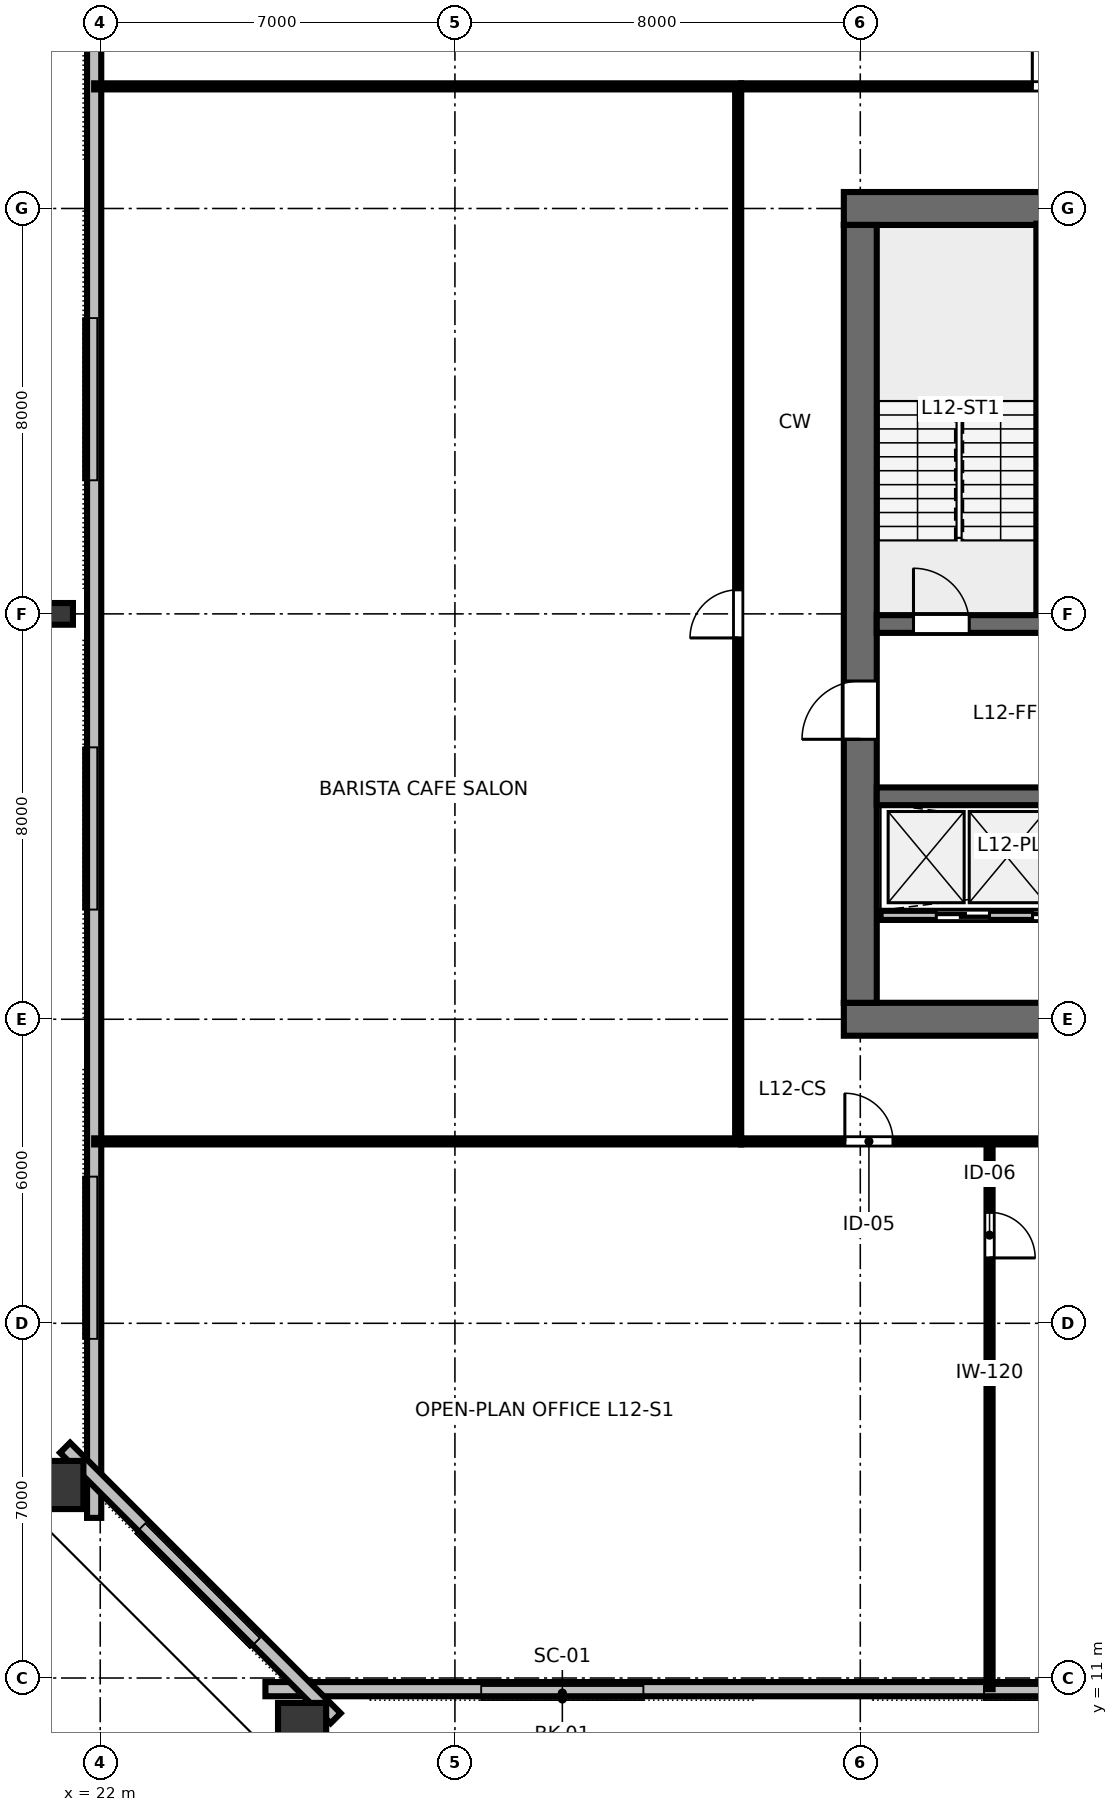
"""IFC4 building model, lengths in metres.
Left out: names, types, materials, properties, quantities, classifications, styles, units other than length and angle.
Written with IfcOpenShell. Run it as: python <this file> out.ifc"""

import sys

from ifc_helpers import new_model, si_unit, direction, frame, frame_2d, origin, origin_2d, place, context, subcontext, project, spatial, rectangle, hollow_rectangle, i_section, extrude, element, fill, save


model = new_model("IFC4")
c1 = context("Model", 3, precision=1e-05, world=origin(), true_north=direction((0.0, 1.0)))
c2 = subcontext(c1, "Body", "Model", "MODEL_VIEW")
j1 = project(units=[si_unit("LENGTHUNIT", "METRE"), si_unit("PLANEANGLEUNIT", "RADIAN")], contexts=[c1])
p1 = place(None, origin())
s1 = spatial("IfcSite", under=j1, at=p1, CompositionType="ELEMENT")
p2 = place(p1, origin())
s2 = spatial("IfcBuilding", under=s1, at=p2, CompositionType="ELEMENT")
p3 = place(p2, frame((0.0, 0.0, 49.6)))
s3 = spatial("IfcBuildingStorey", under=s2, at=p3, CompositionType="ELEMENT", Elevation=49.6)
p4 = place(p3, frame((36.675, 24.0, 0.0), z_axis=(0.0, 0.0, 1.0), x_axis=(1.0, 0.0, 0.0)))
e1 = element("IfcWall", 1, at=p4, inside=s3, PredefinedType="SHEAR", context=c2, shape_type="SweptSolid", body=[
    extrude(rectangle(XDim=18.65, YDim=0.65, at=frame_2d((9.325, 0.0))), origin(), (0.0, 0.0, 1.0), 3.36),
])
p5 = place(p4, frame((5.725, 0.0, 0.0)))
e2 = element("IfcOpeningElement", 2, at=p5, cuts=e1, PredefinedType="OPENING", context=c2, shape_type="SweptSolid", body=[
    extrude(rectangle(XDim=1.6, YDim=2.15, at=frame_2d((0.8, 1.075))), frame((0.0, 0.335, 0.0), z_axis=(0.0, -1.0, 0.0), x_axis=(1.0, 0.0, 0.0)), (0.0, 0.0, 1.0), 0.67),
])
p6 = place(p4, frame((12.125, 0.0, 0.0)))
e3 = element("IfcOpeningElement", 3, at=p6, cuts=e1, PredefinedType="OPENING", context=c2, shape_type="SweptSolid", body=[
    extrude(rectangle(XDim=1.6, YDim=2.15, at=frame_2d((0.8, 1.075))), frame((0.0, 0.335, 0.0), z_axis=(0.0, -1.0, 0.0), x_axis=(1.0, 0.0, 0.0)), (0.0, 0.0, 1.0), 0.67),
])
p7 = place(p3, frame((36.675, 40.0, 0.0), z_axis=(0.0, 0.0, 1.0), x_axis=(1.0, 0.0, 0.0)))
e4 = element("IfcWall", 4, at=p7, inside=s3, PredefinedType="SHEAR", context=c2, shape_type="SweptSolid", body=[
    extrude(rectangle(XDim=18.65, YDim=0.65, at=frame_2d((9.325, 0.0))), origin(), (0.0, 0.0, 1.0), 3.36),
])
p8 = place(p7, frame((8.825, 0.0, 0.0)))
e5 = element("IfcOpeningElement", 5, at=p8, cuts=e4, PredefinedType="OPENING", context=c2, shape_type="SweptSolid", body=[
    extrude(rectangle(XDim=1.0, YDim=2.15, at=frame_2d((0.5, 1.075))), frame((0.0, 0.335, 0.0), z_axis=(0.0, -1.0, 0.0), x_axis=(1.0, 0.0, 0.0)), (0.0, 0.0, 1.0), 0.67),
])
p9 = place(p3, frame((37.0, 24.325, 0.0), z_axis=(0.0, 0.0, 1.0), x_axis=(0.0, 1.0, 0.0)))
e6 = element("IfcWall", 6, at=p9, inside=s3, PredefinedType="SHEAR", context=c2, shape_type="SweptSolid", body=[
    extrude(rectangle(XDim=15.35, YDim=0.65, at=frame_2d((7.675, 0.0))), origin(), (0.0, 0.0, 1.0), 3.36),
])
p10 = place(p9, frame((5.2, 0.0, 0.0)))
e7 = element("IfcOpeningElement", 7, at=p10, cuts=e6, PredefinedType="OPENING", context=c2, shape_type="SweptSolid", body=[
    extrude(rectangle(XDim=1.15, YDim=2.15, at=frame_2d((0.575, 1.075))), frame((0.0, 0.335, 0.0), z_axis=(0.0, -1.0, 0.0), x_axis=(1.0, 0.0, 0.0)), (0.0, 0.0, 1.0), 0.67),
])
p11 = place(p3, frame((37.325, 31.8, 0.0), z_axis=(0.0, 0.0, 1.0), x_axis=(1.0, 0.0, 0.0)))
e8 = element("IfcWall", 8, at=p11, inside=s3, PredefinedType="SHEAR", context=c2, shape_type="SweptSolid", body=[
    extrude(rectangle(XDim=17.35, YDim=0.35, at=frame_2d((8.675, 0.0))), origin(), (0.0, 0.0, 1.0), 3.36),
])
p12 = place(p11, frame((0.725, 0.0, 0.0)))
e9 = element("IfcOpeningElement", 9, at=p12, cuts=e8, PredefinedType="OPENING", context=c2, shape_type="SweptSolid", body=[
    extrude(rectangle(XDim=1.1, YDim=2.15, at=frame_2d((0.55, 1.075))), frame((0.0, 0.185, 0.0), z_axis=(0.0, -1.0, 0.0), x_axis=(1.0, 0.0, 0.0)), (0.0, 0.0, 1.0), 0.37),
])
p13 = place(p11, frame((14.625, 0.0, 0.0)))
e10 = element("IfcOpeningElement", 10, at=p13, cuts=e8, PredefinedType="OPENING", context=c2, shape_type="SweptSolid", body=[
    extrude(rectangle(XDim=1.1, YDim=2.15, at=frame_2d((0.55, 1.075))), frame((0.0, 0.185, 0.0), z_axis=(0.0, -1.0, 0.0), x_axis=(1.0, 0.0, 0.0)), (0.0, 0.0, 1.0), 0.37),
])
p14 = place(p3, frame((37.325, 28.4, 0.0), z_axis=(0.0, 0.0, 1.0), x_axis=(1.0, 0.0, 0.0)))
e11 = element("IfcWall", 11, at=p14, inside=s3, PredefinedType="SHEAR", context=c2, shape_type="SweptSolid", body=[
    extrude(rectangle(XDim=17.35, YDim=0.35, at=frame_2d((8.675, 0.0))), origin(), (0.0, 0.0, 1.0), 3.36),
])
p15 = place(p3, frame((25.984, 9.933, 0.0), z_axis=(0.0, 0.0, 1.0), x_axis=(1.0, 0.0, 0.0)))
e12 = element("IfcColumn", 12, at=p15, inside=s3, PredefinedType="COLUMN", context=c2, shape_type="SweptSolid", body=[
    extrude(hollow_rectangle(XDim=0.95, YDim=1.15, WallThickness=0.06, at=origin_2d()), origin(), (0.0, 0.0, 1.0), 3.358),
])
p16 = place(p3, frame((21.22, 32.0, 0.0), z_axis=(0.0, 0.0, 1.0), x_axis=(0.0, 1.0, 0.0)))
e13 = element("IfcColumn", 13, at=p16, inside=s3, PredefinedType="COLUMN", context=c2, shape_type="SweptSolid", body=[
    extrude(i_section(OverallWidth=0.428, OverallDepth=0.483, WebThickness=0.051, FlangeThickness=0.082, FilletRadius=0.025, at=origin_2d()), origin(), (0.0, 0.0, 1.0), 3.358),
])
p17 = place(p3, frame((21.093, 14.809, 0.0), z_axis=(0.0, 0.0, 1.0), x_axis=(0.0, 1.0, 0.0)))
e14 = element("IfcColumn", 14, at=p17, inside=s3, PredefinedType="COLUMN", context=c2, shape_type="SweptSolid", body=[
    extrude(hollow_rectangle(XDim=0.95, YDim=1.15, WallThickness=0.06, at=origin_2d()), origin(), (0.0, 0.0, 1.0), 3.358),
])
p18 = place(p3, frame((25.26, 10.78, 0.0), z_axis=(0.0, 0.0, 1.0), x_axis=(1.0, 0.0, 0.0)))
e15 = element("IfcWall", 15, at=p18, inside=s3, PredefinedType="STANDARD", context=c2, shape_type="SweptSolid", body=[
    extrude(rectangle(XDim=41.48, YDim=0.28, at=frame_2d((20.74, 0.0))), origin(), (0.0, 0.0, 1.0), 3.36),
])
p19 = place(p3, frame((21.88, 49.84, 0.0), z_axis=(0.0, 0.0, 1.0), x_axis=(0.0, -1.0, 0.0)))
e16 = element("IfcWall", 16, at=p19, inside=s3, PredefinedType="STANDARD", context=c2, shape_type="SweptSolid", body=[
    extrude(rectangle(XDim=35.68, YDim=0.28, at=frame_2d((17.84, 0.0))), origin(), (0.0, 0.0, 1.0), 3.36),
])
p20 = place(p3, frame((21.306, 15.545, 0.0), z_axis=(0.0, 0.0, 1.0), x_axis=(0.707106781187, -0.707106781187, 0.0)))
e17 = element("IfcWall", 17, at=p20, inside=s3, PredefinedType="STANDARD", context=c2, shape_type="SweptSolid", body=[
    extrude(rectangle(XDim=7.551, YDim=0.28, at=frame_2d((3.775, 0.0))), origin(), (0.0, 0.0, 1.0), 3.36),
])
p21 = place(p3, frame((40.65, 32.0, 0.0), z_axis=(0.0, 0.0, 1.0), x_axis=(0.0, 1.0, 0.0)))
e18 = element("IfcWall", 18, at=p21, inside=s3, PredefinedType="SHEAR", context=c2, shape_type="SweptSolid", body=[
    extrude(rectangle(XDim=7.7, YDim=0.35, at=frame_2d((3.85, 0.0))), origin(), (0.0, 0.0, 1.0), 3.6),
])
p22 = place(p3, frame((37.4, 26.05, 0.0), z_axis=(0.0, 0.0, 1.0), x_axis=(1.0, 0.0, 0.0)))
e19 = element("IfcWall", 19, at=p22, inside=s3, PredefinedType="PARTITIONING", context=c2, shape_type="SweptSolid", body=[
    extrude(rectangle(XDim=17.2, YDim=0.18, at=frame_2d((8.6, 0.0))), origin(), (0.0, 0.0, 1.0), 3.36),
])
p23 = place(p22, frame((1.1, 0.0, 0.0)))
e20 = element("IfcOpeningElement", 20, at=p23, cuts=e19, PredefinedType="OPENING", context=c2, shape_type="SweptSolid", body=[
    extrude(rectangle(XDim=1.05, YDim=2.15, at=frame_2d((0.525, 1.075))), frame((0.0, 0.1, 0.0), z_axis=(0.0, -1.0, 0.0), x_axis=(1.0, 0.0, 0.0)), (0.0, 0.0, 1.0), 0.2),
])
p24 = place(p22, frame((3.0, 0.0, 0.0)))
e21 = element("IfcOpeningElement", 21, at=p24, cuts=e19, PredefinedType="OPENING", context=c2, shape_type="SweptSolid", body=[
    extrude(rectangle(XDim=1.05, YDim=2.15, at=frame_2d((0.525, 1.075))), frame((0.0, 0.1, 0.0), z_axis=(0.0, -1.0, 0.0), x_axis=(1.0, 0.0, 0.0)), (0.0, 0.0, 1.0), 0.2),
])
p25 = place(p3, frame((39.551, 21.59, 0.0), z_axis=(0.0, 0.0, 1.0), x_axis=(0.0, -1.0, 0.0)))
e22 = element("IfcWall", 22, at=p25, inside=s3, PredefinedType="PARTITIONING", context=c2, shape_type="SweptSolid", body=[
    extrude(rectangle(XDim=10.81, YDim=0.12, at=frame_2d((5.405, 0.0))), origin(), (0.0, 0.0, 1.0), 2.64),
])
p26 = place(p25, frame((1.4, 0.0, 0.0)))
e23 = element("IfcOpeningElement", 23, at=p26, cuts=e22, PredefinedType="OPENING", context=c2, shape_type="SweptSolid", body=[
    extrude(rectangle(XDim=0.9, YDim=2.15, at=frame_2d((0.45, 1.075))), frame((0.0, 0.07, 0.0), z_axis=(0.0, -1.0, 0.0), x_axis=(1.0, 0.0, 0.0)), (0.0, 0.0, 1.0), 0.14),
])
p27 = place(p3, frame((34.65, 21.59, 0.0), z_axis=(0.0, 0.0, 1.0), x_axis=(1.0, 0.0, 0.0)))
e24 = element("IfcWall", 24, at=p27, inside=s3, PredefinedType="PARTITIONING", context=c2, shape_type="SweptSolid", body=[
    extrude(rectangle(XDim=22.7, YDim=0.12, at=frame_2d((11.35, 0.0))), origin(), (0.0, 0.0, 1.0), 2.64),
])
p28 = place(p27, frame((2.045, 0.0, 0.0)))
e25 = element("IfcOpeningElement", 25, at=p28, cuts=e24, PredefinedType="OPENING", context=c2, shape_type="SweptSolid", body=[
    extrude(rectangle(XDim=0.95, YDim=2.15, at=frame_2d((0.475, 1.075))), frame((0.0, 0.07, 0.0), z_axis=(0.0, -1.0, 0.0), x_axis=(1.0, 0.0, 0.0)), (0.0, 0.0, 1.0), 0.14),
])
p29 = place(p27, frame((7.126, 0.0, 0.0)))
e26 = element("IfcOpeningElement", 26, at=p29, cuts=e24, PredefinedType="OPENING", context=c2, shape_type="SweptSolid", body=[
    extrude(rectangle(XDim=0.95, YDim=2.15, at=frame_2d((0.475, 1.075))), frame((0.0, 0.07, 0.0), z_axis=(0.0, -1.0, 0.0), x_axis=(1.0, 0.0, 0.0)), (0.0, 0.0, 1.0), 0.14),
])
p30 = place(p27, frame((11.509, 0.0, 0.0)))
e27 = element("IfcOpeningElement", 27, at=p30, cuts=e24, PredefinedType="OPENING", context=c2, shape_type="SweptSolid", body=[
    extrude(rectangle(XDim=0.95, YDim=2.15, at=frame_2d((0.475, 1.075))), frame((0.0, 0.07, 0.0), z_axis=(0.0, -1.0, 0.0), x_axis=(1.0, 0.0, 0.0)), (0.0, 0.0, 1.0), 0.14),
])
p31 = place(p27, frame((17.638, 0.0, 0.0)))
e28 = element("IfcOpeningElement", 28, at=p31, cuts=e24, PredefinedType="OPENING", context=c2, shape_type="SweptSolid", body=[
    extrude(rectangle(XDim=0.95, YDim=2.15, at=frame_2d((0.475, 1.075))), frame((0.0, 0.07, 0.0), z_axis=(0.0, -1.0, 0.0), x_axis=(1.0, 0.0, 0.0)), (0.0, 0.0, 1.0), 0.14),
])
p32 = place(p3, frame((34.65, 42.41, 0.0), z_axis=(0.0, 0.0, 1.0), x_axis=(1.0, 0.0, 0.0)))
e29 = element("IfcWall", 29, at=p32, inside=s3, PredefinedType="PARTITIONING", context=c2, shape_type="SweptSolid", body=[
    extrude(rectangle(XDim=22.7, YDim=0.12, at=frame_2d((11.35, 0.0))), origin(), (0.0, 0.0, 1.0), 2.64),
])
p33 = place(p32, frame((5.745, 0.0, 0.0)))
e30 = element("IfcOpeningElement", 30, at=p33, cuts=e29, PredefinedType="OPENING", context=c2, shape_type="SweptSolid", body=[
    extrude(rectangle(XDim=0.95, YDim=2.15, at=frame_2d((0.475, 1.075))), frame((0.0, 0.07, 0.0), z_axis=(0.0, -1.0, 0.0), x_axis=(1.0, 0.0, 0.0)), (0.0, 0.0, 1.0), 0.14),
])
p34 = place(p32, frame((16.955, 0.0, 0.0)))
e31 = element("IfcOpeningElement", 31, at=p34, cuts=e29, PredefinedType="OPENING", context=c2, shape_type="SweptSolid", body=[
    extrude(rectangle(XDim=0.95, YDim=2.15, at=frame_2d((0.475, 1.075))), frame((0.0, 0.07, 0.0), z_axis=(0.0, -1.0, 0.0), x_axis=(1.0, 0.0, 0.0)), (0.0, 0.0, 1.0), 0.14),
])
p35 = place(p3, frame((34.59, 21.65, 0.0), z_axis=(0.0, 0.0, 1.0), x_axis=(0.0, 1.0, 0.0)))
e32 = element("IfcWall", 32, at=p35, inside=s3, PredefinedType="PARTITIONING", context=c2, shape_type="SweptSolid", body=[
    extrude(rectangle(XDim=20.7, YDim=0.12, at=frame_2d((10.35, 0.0))), origin(), (0.0, 0.0, 1.0), 2.64),
])
p36 = place(p35, frame((9.875, 0.0, 0.0)))
e33 = element("IfcOpeningElement", 33, at=p36, cuts=e32, PredefinedType="OPENING", context=c2, shape_type="SweptSolid", body=[
    extrude(rectangle(XDim=0.95, YDim=2.15, at=frame_2d((0.475, 1.075))), frame((0.0, 0.07, 0.0), z_axis=(0.0, -1.0, 0.0), x_axis=(1.0, 0.0, 0.0)), (0.0, 0.0, 1.0), 0.14),
])
for number, where, z_axis, x_axis in (
    (34, (34.65, 21.59, 0.0), (0.0, 0.0, 1.0), (-1.0, 0.0, 0.0)),
    (35, (34.65, 42.41, 0.0), (0.0, 0.0, 1.0), (-1.0, 0.0, 0.0)),
):
    element("IfcWall", number, at=place(p3, frame(where, z_axis=z_axis, x_axis=x_axis)), inside=s3, PredefinedType="PARTITIONING", context=c2, shape_type="SweptSolid", body=[
        extrude(rectangle(XDim=12.77, YDim=0.12, at=frame_2d((6.385, 0.0))), origin(), (0.0, 0.0, 1.0), 2.64),
    ])
p37 = place(p12, origin())
e36 = element("IfcDoor", 36, at=p37, inside=s3, OperationType="SINGLE_SWING_LEFT", PredefinedType="DOOR", context=c2, shape_type="SweptSolid", body=[
    extrude(rectangle(XDim=1.1, YDim=2.15, at=frame_2d((0.55, 1.075))), frame((0.0, 0.025, 0.0), z_axis=(0.0, -1.0, 0.0), x_axis=(1.0, 0.0, 0.0)), (0.0, 0.0, 1.0), 0.05),
])
fill(e9, e36)
p38 = place(p10, origin())
e37 = element("IfcDoor", 37, at=p38, inside=s3, OperationType="SINGLE_SWING_LEFT", PredefinedType="DOOR", context=c2, shape_type="SweptSolid", body=[
    extrude(rectangle(XDim=1.15, YDim=2.15, at=frame_2d((0.575, 1.075))), frame((0.0, 0.025, 0.0), z_axis=(0.0, -1.0, 0.0), x_axis=(1.0, 0.0, 0.0)), (0.0, 0.0, 1.0), 0.05),
])
fill(e7, e37)
p39 = place(p23, origin())
e38 = element("IfcDoor", 38, at=p39, inside=s3, OperationType="SLIDING_TO_LEFT", PredefinedType="DOOR", context=c2, shape_type="SweptSolid", body=[
    extrude(rectangle(XDim=1.05, YDim=2.15, at=frame_2d((0.525, 1.075))), frame((0.0, 0.025, 0.0), z_axis=(0.0, -1.0, 0.0), x_axis=(1.0, 0.0, 0.0)), (0.0, 0.0, 1.0), 0.05),
])
fill(e20, e38)
p40 = place(p24, origin())
e39 = element("IfcDoor", 39, at=p40, inside=s3, OperationType="SLIDING_TO_RIGHT", PredefinedType="DOOR", context=c2, shape_type="SweptSolid", body=[
    extrude(rectangle(XDim=1.05, YDim=2.15, at=frame_2d((0.525, 1.075))), frame((0.0, 0.025, 0.0), z_axis=(0.0, -1.0, 0.0), x_axis=(1.0, 0.0, 0.0)), (0.0, 0.0, 1.0), 0.05),
])
fill(e21, e39)
p41 = place(p26, origin())
e40 = element("IfcDoor", 40, at=p41, inside=s3, OperationType="SINGLE_SWING_RIGHT", PredefinedType="DOOR", context=c2, shape_type="SweptSolid", body=[
    extrude(rectangle(XDim=0.9, YDim=2.15, at=frame_2d((0.45, 1.075))), frame((0.0, 0.025, 0.0), z_axis=(0.0, -1.0, 0.0), x_axis=(1.0, 0.0, 0.0)), (0.0, 0.0, 1.0), 0.05),
])
fill(e23, e40)
p42 = place(p28, origin())
e41 = element("IfcDoor", 41, at=p42, inside=s3, OperationType="SINGLE_SWING_LEFT", PredefinedType="DOOR", context=c2, shape_type="SweptSolid", body=[
    extrude(rectangle(XDim=0.95, YDim=2.15, at=frame_2d((0.475, 1.075))), frame((0.0, 0.025, 0.0), z_axis=(0.0, -1.0, 0.0), x_axis=(1.0, 0.0, 0.0)), (0.0, 0.0, 1.0), 0.05),
])
fill(e25, e41)
p43 = place(p33, origin())
e42 = element("IfcDoor", 42, at=p43, inside=s3, OperationType="SINGLE_SWING_LEFT", PredefinedType="DOOR", context=c2, shape_type="SweptSolid", body=[
    extrude(rectangle(XDim=0.95, YDim=2.15, at=frame_2d((0.475, 1.075))), frame((0.0, 0.025, 0.0), z_axis=(0.0, -1.0, 0.0), x_axis=(1.0, 0.0, 0.0)), (0.0, 0.0, 1.0), 0.05),
])
fill(e30, e42)
p44 = place(p36, origin())
e43 = element("IfcDoor", 43, at=p44, inside=s3, OperationType="SINGLE_SWING_LEFT", PredefinedType="DOOR", context=c2, shape_type="SweptSolid", body=[
    extrude(rectangle(XDim=0.95, YDim=2.15, at=frame_2d((0.475, 1.075))), frame((0.0, 0.025, 0.0), z_axis=(0.0, -1.0, 0.0), x_axis=(1.0, 0.0, 0.0)), (0.0, 0.0, 1.0), 0.05),
])
fill(e33, e43)
save(model, sys.argv[1])
